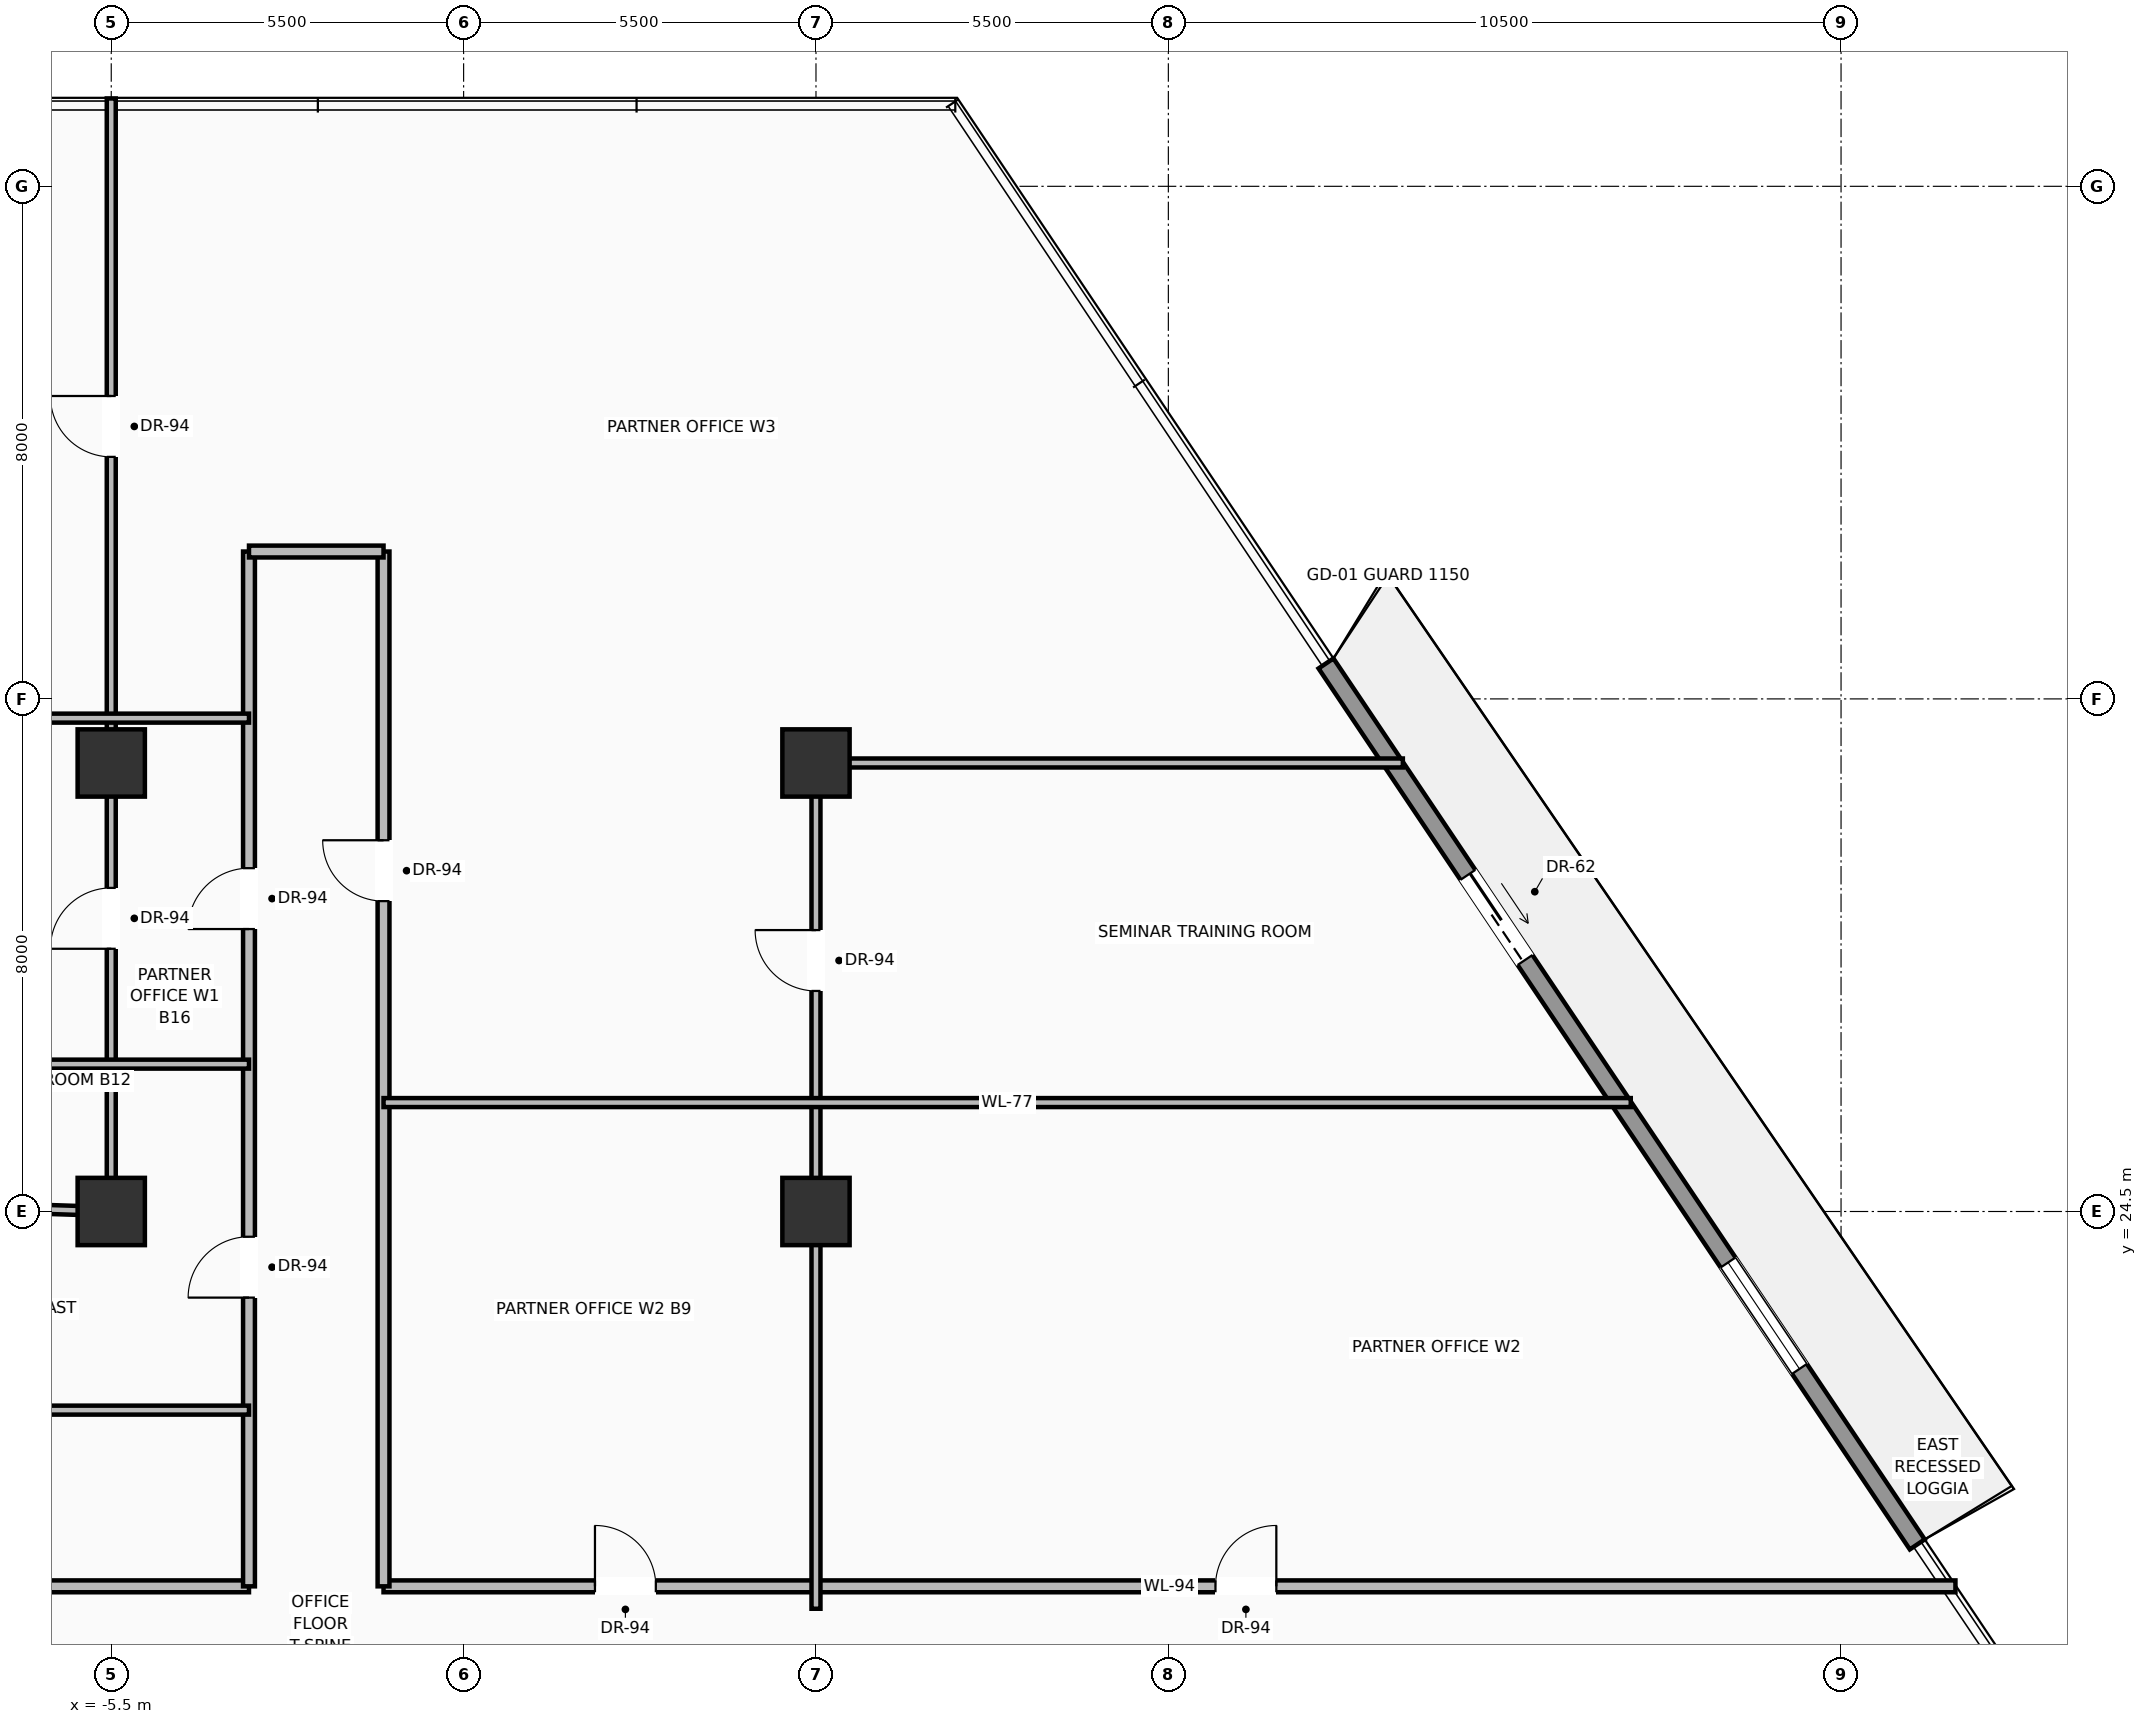
"""IFC4 building model, lengths in metres.
Left out: names, types, materials, properties, quantities, classifications, styles, units other than length and angle.
Written with IfcOpenShell. Run it as: python <this file> out.ifc"""

import sys

from ifc_helpers import new_model, si_unit, direction, frame, frame_2d, origin, origin_2d, place, context, subcontext, project, spatial, rectangle, extrude, source, transform, mapped, element, fill, save


model = new_model("IFC4")
c1 = context("Model", 3, precision=1e-05, world=origin(), true_north=direction((0.0, 1.0)))
c2 = subcontext(c1, "Body", "Model", "MODEL_VIEW")
j1 = project(units=[si_unit("LENGTHUNIT", "METRE"), si_unit("PLANEANGLEUNIT", "RADIAN")], contexts=[c1])
p1 = place(None, origin())
s1 = spatial("IfcSite", under=j1, at=p1, CompositionType="ELEMENT")
p2 = place(p1, origin())
s2 = spatial("IfcBuilding", under=s1, at=p2, CompositionType="ELEMENT")
p3 = place(p2, frame((0.0, 0.0, 46.0)))
s3 = spatial("IfcBuildingStorey", under=s2, at=p3, CompositionType="ELEMENT", Elevation=46.0)
m1 = source(origin(), c2, "Body", "SweptSolid", [
    extrude(rectangle(XDim=1.05, YDim=1.05, at=origin_2d()), origin(), (0.0, 0.0, 1.0), 3.7),
])
for number, where, z_axis, x_axis in (
    (1, (-5.5, 24.5, 0.0), (0.0, 0.0, 1.0), (1.0, 0.0, 0.0)),
    (2, (5.5, 24.5, 0.0), (0.0, 0.0, 1.0), (1.0, 0.0, 0.0)),
    (3, (-5.5, 31.5, 0.0), (0.0, 0.0, 1.0), (1.0, 0.0, 0.0)),
    (4, (5.5, 31.5, 0.0), (0.0, 0.0, 1.0), (1.0, 0.0, 0.0)),
):
    element("IfcColumn", number, at=place(p3, frame(where, z_axis=z_axis, x_axis=x_axis)), inside=s3, PredefinedType="COLUMN", context=c2, shape_type="MappedRepresentation", body=[
        mapped(m1, transform((0.0, 0.0, 0.0), scale=1.0)),
    ])
p4 = place(p3, frame((13.461, 33.053, 0.0), z_axis=(0.0, 0.0, 1.0), x_axis=(0.557313833553, -0.830301927573, 0.0)))
e5 = element("IfcWall", 5, at=p4, inside=s3, PredefinedType="SOLIDWALL", context=c2, shape_type="SweptSolid", body=[
    extrude(rectangle(XDim=16.559, YDim=0.28, at=frame_2d((8.28, 0.0))), origin(), (0.0, 0.0, 1.0), 3.03),
])
p5 = place(p4, frame((3.974, 0.0, 0.0)))
e6 = element("IfcOpeningElement", 6, at=p5, cuts=e5, PredefinedType="OPENING", context=c2, shape_type="SweptSolid", body=[
    extrude(rectangle(XDim=1.6, YDim=2.35, at=frame_2d((0.8, 1.175))), frame((0.0, 0.15, 0.0), z_axis=(0.0, -1.0, 0.0), x_axis=(1.0, 0.0, 0.0)), (0.0, 0.0, 1.0), 0.3),
])
p6 = place(p4, frame((11.26, 0.0, 0.9)))
e7 = element("IfcOpeningElement", 7, at=p6, cuts=e5, PredefinedType="OPENING", context=c2, shape_type="SweptSolid", body=[
    extrude(rectangle(XDim=2.0, YDim=1.85, at=frame_2d((1.0, 0.925))), frame((0.0, 0.15, 0.0), z_axis=(0.0, -1.0, 0.0), x_axis=(1.0, 0.0, 0.0)), (0.0, 0.0, 1.0), 0.3),
])
p7 = place(p3, frame((-23.096, 18.65, 0.0), z_axis=(0.0, 0.0, 1.0), x_axis=(1.0, 0.0, 0.0)))
e8 = element("IfcWall", 8, at=p7, inside=s3, PredefinedType="PARTITIONING", context=c2, shape_type="SweptSolid", body=[
    extrude(rectangle(XDim=19.746, YDim=0.185, at=frame_2d((9.873, 0.0))), origin(), (0.0, 0.0, 1.0), 2.747),
])
p8 = place(p7, frame((8.445, 0.0, 0.0)))
e9 = element("IfcOpeningElement", 9, at=p8, cuts=e8, PredefinedType="OPENING", context=c2, shape_type="SweptSolid", body=[
    extrude(rectangle(XDim=0.95, YDim=2.2, at=frame_2d((0.475, 1.1))), frame((0.0, 0.103, 0.0), z_axis=(0.0, -1.0, 0.0), x_axis=(1.0, 0.0, 0.0)), (0.0, 0.0, 1.0), 0.205),
])
p9 = place(p7, frame((14.85, 0.0, 0.0)))
e10 = element("IfcOpeningElement", 10, at=p9, cuts=e8, PredefinedType="OPENING", context=c2, shape_type="SweptSolid", body=[
    extrude(rectangle(XDim=0.95, YDim=2.2, at=frame_2d((0.475, 1.1))), frame((0.0, 0.103, 0.0), z_axis=(0.0, -1.0, 0.0), x_axis=(1.0, 0.0, 0.0)), (0.0, 0.0, 1.0), 0.205),
])
p10 = place(p3, frame((-1.25, 18.65, 0.0), z_axis=(0.0, 0.0, 1.0), x_axis=(1.0, 0.0, 0.0)))
e11 = element("IfcWall", 11, at=p10, inside=s3, PredefinedType="PARTITIONING", context=c2, shape_type="SweptSolid", body=[
    extrude(rectangle(XDim=24.535, YDim=0.185, at=frame_2d((12.268, 0.0))), origin(), (0.0, 0.0, 1.0), 2.747),
])
p11 = place(p10, frame((12.986, 0.0, 0.0)))
e12 = element("IfcOpeningElement", 12, at=p11, cuts=e11, PredefinedType="OPENING", context=c2, shape_type="SweptSolid", body=[
    extrude(rectangle(XDim=0.95, YDim=2.2, at=frame_2d((0.475, 1.1))), frame((0.0, 0.103, 0.0), z_axis=(0.0, -1.0, 0.0), x_axis=(1.0, 0.0, 0.0)), (0.0, 0.0, 1.0), 0.205),
])
p12 = place(p10, frame((3.3, 0.0, 0.0)))
e13 = element("IfcOpeningElement", 13, at=p12, cuts=e11, PredefinedType="OPENING", context=c2, shape_type="SweptSolid", body=[
    extrude(rectangle(XDim=0.95, YDim=2.2, at=frame_2d((0.475, 1.1))), frame((0.0, 0.103, 0.0), z_axis=(0.0, -1.0, 0.0), x_axis=(1.0, 0.0, 0.0)), (0.0, 0.0, 1.0), 0.205),
])
p13 = place(p3, frame((-3.35, 18.65, 0.0), z_axis=(0.0, 0.0, 1.0), x_axis=(0.0, 1.0, 0.0)))
e14 = element("IfcWall", 14, at=p13, inside=s3, PredefinedType="PARTITIONING", context=c2, shape_type="SweptSolid", body=[
    extrude(rectangle(XDim=16.15, YDim=0.185, at=frame_2d((8.075, 0.0))), origin(), (0.0, 0.0, 1.0), 2.747),
])
p14 = place(p13, frame((4.506, 0.0, 0.0)))
e15 = element("IfcOpeningElement", 15, at=p14, cuts=e14, PredefinedType="OPENING", context=c2, shape_type="SweptSolid", body=[
    extrude(rectangle(XDim=0.95, YDim=2.2, at=frame_2d((0.475, 1.1))), frame((0.0, 0.103, 0.0), z_axis=(0.0, -1.0, 0.0), x_axis=(1.0, 0.0, 0.0)), (0.0, 0.0, 1.0), 0.205),
])
p15 = place(p13, frame((10.258, 0.0, 0.0)))
e16 = element("IfcOpeningElement", 16, at=p15, cuts=e14, PredefinedType="OPENING", context=c2, shape_type="SweptSolid", body=[
    extrude(rectangle(XDim=0.95, YDim=2.2, at=frame_2d((0.475, 1.1))), frame((0.0, 0.103, 0.0), z_axis=(0.0, -1.0, 0.0), x_axis=(1.0, 0.0, 0.0)), (0.0, 0.0, 1.0), 0.205),
])
p16 = place(p3, frame((-1.25, 18.65, 0.0), z_axis=(0.0, 0.0, 1.0), x_axis=(0.0, 1.0, 0.0)))
e17 = element("IfcWall", 17, at=p16, inside=s3, PredefinedType="PARTITIONING", context=c2, shape_type="SweptSolid", body=[
    extrude(rectangle(XDim=16.15, YDim=0.185, at=frame_2d((8.075, 0.0))), origin(), (0.0, 0.0, 1.0), 2.747),
])
p17 = place(p16, frame((10.694, 0.0, 0.0)))
e18 = element("IfcOpeningElement", 18, at=p17, cuts=e17, PredefinedType="OPENING", context=c2, shape_type="SweptSolid", body=[
    extrude(rectangle(XDim=0.95, YDim=2.2, at=frame_2d((0.475, 1.1))), frame((0.0, 0.103, 0.0), z_axis=(0.0, -1.0, 0.0), x_axis=(1.0, 0.0, 0.0)), (0.0, 0.0, 1.0), 0.205),
])
p18 = place(p3, frame((-3.35, 34.8, 0.0), z_axis=(0.0, 0.0, 1.0), x_axis=(1.0, 0.0, 0.0)))
e19 = element("IfcWall", 19, at=p18, inside=s3, PredefinedType="PARTITIONING", context=c2, shape_type="SweptSolid", body=[
    extrude(rectangle(XDim=2.1, YDim=0.185, at=frame_2d((1.05, 0.0))), origin(), (0.0, 0.0, 1.0), 2.979),
])
p19 = place(p3, frame((-5.5, 24.5, 0.0), z_axis=(0.0, 0.0, 1.0), x_axis=(0.0, 1.0, 0.0)))
e20 = element("IfcWall", 20, at=p19, inside=s3, PredefinedType="PARTITIONING", context=c2, shape_type="SweptSolid", body=[
    extrude(rectangle(XDim=17.371, YDim=0.14, at=frame_2d((8.686, 0.0))), origin(), (0.0, 0.0, 1.0), 2.747),
])
p20 = place(p19, frame((11.777, 0.0, 0.0)))
e21 = element("IfcOpeningElement", 21, at=p20, cuts=e20, PredefinedType="OPENING", context=c2, shape_type="SweptSolid", body=[
    extrude(rectangle(XDim=0.95, YDim=2.2, at=frame_2d((0.475, 1.1))), frame((0.0, 0.08, 0.0), z_axis=(0.0, -1.0, 0.0), x_axis=(1.0, 0.0, 0.0)), (0.0, 0.0, 1.0), 0.16),
])
p21 = place(p19, frame((4.1, 0.0, 0.0)))
e22 = element("IfcOpeningElement", 22, at=p21, cuts=e20, PredefinedType="OPENING", context=c2, shape_type="SweptSolid", body=[
    extrude(rectangle(XDim=0.95, YDim=2.2, at=frame_2d((0.475, 1.1))), frame((0.0, 0.08, 0.0), z_axis=(0.0, -1.0, 0.0), x_axis=(1.0, 0.0, 0.0)), (0.0, 0.0, 1.0), 0.16),
])
p22 = place(p3, frame((5.5, 18.3, 0.0), z_axis=(0.0, 0.0, 1.0), x_axis=(0.0, 1.0, 0.0)))
e23 = element("IfcWall", 23, at=p22, inside=s3, PredefinedType="PARTITIONING", context=c2, shape_type="SweptSolid", body=[
    extrude(rectangle(XDim=13.2, YDim=0.14, at=frame_2d((6.6, 0.0))), origin(), (0.0, 0.0, 1.0), 2.747),
])
p23 = place(p22, frame((9.642, 0.0, 0.0)))
e24 = element("IfcOpeningElement", 24, at=p23, cuts=e23, PredefinedType="OPENING", context=c2, shape_type="SweptSolid", body=[
    extrude(rectangle(XDim=0.95, YDim=2.2, at=frame_2d((0.475, 1.1))), frame((0.0, 0.08, 0.0), z_axis=(0.0, -1.0, 0.0), x_axis=(1.0, 0.0, 0.0)), (0.0, 0.0, 1.0), 0.16),
])
p24 = place(p3, frame((-18.819, 24.928, 0.0), z_axis=(0.0, 0.0, 1.0), x_axis=(0.999482929185, -0.032153915288, 0.0)))
e25 = element("IfcWall", 25, at=p24, inside=s3, PredefinedType="PARTITIONING", context=c2, shape_type="SweptSolid", body=[
    extrude(rectangle(XDim=13.325, YDim=0.14, at=frame_2d((6.663, 0.0))), origin(), (0.0, 0.0, 1.0), 2.747),
])
p25 = place(p24, frame((9.438, 0.0, 0.0)))
e26 = element("IfcOpeningElement", 26, at=p25, cuts=e25, PredefinedType="OPENING", context=c2, shape_type="SweptSolid", body=[
    extrude(rectangle(XDim=0.95, YDim=2.2, at=frame_2d((0.475, 1.1))), frame((0.0, 0.08, 0.0), z_axis=(0.0, -1.0, 0.0), x_axis=(1.0, 0.0, 0.0)), (0.0, 0.0, 1.0), 0.16),
])
p26 = place(p24, frame((3.471, 0.0, 0.0)))
e27 = element("IfcOpeningElement", 27, at=p26, cuts=e25, PredefinedType="OPENING", context=c2, shape_type="SweptSolid", body=[
    extrude(rectangle(XDim=0.95, YDim=2.2, at=frame_2d((0.475, 1.1))), frame((0.0, 0.08, 0.0), z_axis=(0.0, -1.0, 0.0), x_axis=(1.0, 0.0, 0.0)), (0.0, 0.0, 1.0), 0.16),
])
p27 = place(p3, frame((5.5, 31.5, 0.0), z_axis=(0.0, 0.0, 1.0), x_axis=(1.0, 0.0, 0.0)))
e28 = element("IfcWall", 28, at=p27, inside=s3, PredefinedType="PARTITIONING", context=c2, shape_type="SweptSolid", body=[
    extrude(rectangle(XDim=9.16, YDim=0.14, at=frame_2d((4.58, 0.0))), origin(), (0.0, 0.0, 1.0), 2.747),
])
p28 = place(p3, frame((-21.223, 21.4, 0.0), z_axis=(0.0, 0.0, 1.0), x_axis=(1.0, 0.0, 0.0)))
e29 = element("IfcWall", 29, at=p28, inside=s3, PredefinedType="PARTITIONING", context=c2, shape_type="SweptSolid", body=[
    extrude(rectangle(XDim=17.873, YDim=0.14, at=frame_2d((8.936, 0.0))), origin(), (0.0, 0.0, 1.0), 2.747),
])
p29 = place(p28, frame((4.681, 0.0, 0.0)))
e30 = element("IfcOpeningElement", 30, at=p29, cuts=e29, PredefinedType="OPENING", context=c2, shape_type="SweptSolid", body=[
    extrude(rectangle(XDim=0.95, YDim=2.2, at=frame_2d((0.475, 1.1))), frame((0.0, 0.08, 0.0), z_axis=(0.0, -1.0, 0.0), x_axis=(1.0, 0.0, 0.0)), (0.0, 0.0, 1.0), 0.16),
])
p30 = place(p3, frame((-17.543, 26.8, 0.0), z_axis=(0.0, 0.0, 1.0), x_axis=(1.0, 0.0, 0.0)))
e31 = element("IfcWall", 31, at=p30, inside=s3, PredefinedType="PARTITIONING", context=c2, shape_type="SweptSolid", body=[
    extrude(rectangle(XDim=14.193, YDim=0.14, at=frame_2d((7.097, 0.0))), origin(), (0.0, 0.0, 1.0), 2.747),
])
p31 = place(p30, frame((2.88, 0.0, 0.0)))
e32 = element("IfcOpeningElement", 32, at=p31, cuts=e31, PredefinedType="OPENING", context=c2, shape_type="SweptSolid", body=[
    extrude(rectangle(XDim=0.95, YDim=2.2, at=frame_2d((0.475, 1.1))), frame((0.0, 0.08, 0.0), z_axis=(0.0, -1.0, 0.0), x_axis=(1.0, 0.0, 0.0)), (0.0, 0.0, 1.0), 0.16),
])
p32 = place(p3, frame((-13.864, 32.2, 0.0), z_axis=(0.0, 0.0, 1.0), x_axis=(1.0, 0.0, 0.0)))
e33 = element("IfcWall", 33, at=p32, inside=s3, PredefinedType="PARTITIONING", context=c2, shape_type="SweptSolid", body=[
    extrude(rectangle(XDim=10.514, YDim=0.14, at=frame_2d((5.257, 0.0))), origin(), (0.0, 0.0, 1.0), 2.747),
])
p33 = place(p3, frame((-1.25, 26.2, 0.0), z_axis=(0.0, 0.0, 1.0), x_axis=(1.0, 0.0, 0.0)))
e34 = element("IfcWall", 34, at=p33, inside=s3, PredefinedType="PARTITIONING", context=c2, shape_type="SweptSolid", body=[
    extrude(rectangle(XDim=19.468, YDim=0.14, at=frame_2d((9.734, 0.0))), origin(), (0.0, 0.0, 1.0), 2.747),
])
m2 = source(origin(), c2, "Body", "SweptSolid", [
    extrude(rectangle(XDim=1.6, YDim=2.35, at=frame_2d((0.8, 1.175))), frame((0.0, 0.025, 0.0), z_axis=(0.0, -1.0, 0.0), x_axis=(1.0, 0.0, 0.0)), (0.0, 0.0, 1.0), 0.05),
])
p34 = place(p5, origin())
e35 = element("IfcDoor", 35, at=p34, inside=s3, OperationType="SLIDING_TO_RIGHT", PredefinedType="DOOR", context=c2, shape_type="MappedRepresentation", body=[
    mapped(m2, transform((0.0, 0.0, 0.0), scale=1.0)),
])
fill(e6, e35)
m3 = source(origin(), c2, "Body", "SweptSolid", [
    extrude(rectangle(XDim=2.0, YDim=1.85, at=frame_2d((1.0, 0.925))), frame((0.0, 0.03, 0.0), z_axis=(0.0, -1.0, 0.0), x_axis=(1.0, 0.0, 0.0)), (0.0, 0.0, 1.0), 0.06),
])
p35 = place(p6, origin())
e36 = element("IfcWindow", 36, at=p35, inside=s3, PartitioningType="SINGLE_PANEL", PredefinedType="WINDOW", context=c2, shape_type="MappedRepresentation", body=[
    mapped(m3, transform((0.0, 0.0, 0.0), scale=1.0)),
])
fill(e7, e36)
m4 = source(origin(), c2, "Body", "SweptSolid", [
    extrude(rectangle(XDim=0.95, YDim=2.2, at=frame_2d((0.475, 1.1))), frame((0.0, 0.025, 0.0), z_axis=(0.0, -1.0, 0.0), x_axis=(1.0, 0.0, 0.0)), (0.0, 0.0, 1.0), 0.05),
])
p36 = place(p11, origin())
e37 = element("IfcDoor", 37, at=p36, inside=s3, OperationType="SINGLE_SWING_RIGHT", PredefinedType="DOOR", context=c2, shape_type="MappedRepresentation", body=[
    mapped(m4, transform((0.0, 0.0, 0.0), scale=1.0)),
])
fill(e12, e37)
p37 = place(p14, origin())
e38 = element("IfcDoor", 38, at=p37, inside=s3, OperationType="SINGLE_SWING_LEFT", PredefinedType="DOOR", context=c2, shape_type="MappedRepresentation", body=[
    mapped(m4, transform((0.0, 0.0, 0.0), scale=1.0)),
])
fill(e15, e38)
p38 = place(p17, origin())
e39 = element("IfcDoor", 39, at=p38, inside=s3, OperationType="SINGLE_SWING_RIGHT", PredefinedType="DOOR", context=c2, shape_type="MappedRepresentation", body=[
    mapped(m4, transform((0.0, 0.0, 0.0), scale=1.0)),
])
fill(e18, e39)
p39 = place(p12, origin())
e40 = element("IfcDoor", 40, at=p39, inside=s3, OperationType="SINGLE_SWING_LEFT", PredefinedType="DOOR", context=c2, shape_type="MappedRepresentation", body=[
    mapped(m4, transform((0.0, 0.0, 0.0), scale=1.0)),
])
fill(e13, e40)
p40 = place(p23, origin())
e41 = element("IfcDoor", 41, at=p40, inside=s3, OperationType="SINGLE_SWING_RIGHT", PredefinedType="DOOR", context=c2, shape_type="MappedRepresentation", body=[
    mapped(m4, transform((0.0, 0.0, 0.0), scale=1.0)),
])
fill(e24, e41)
p41 = place(p15, origin())
e42 = element("IfcDoor", 42, at=p41, inside=s3, OperationType="SINGLE_SWING_LEFT", PredefinedType="DOOR", context=c2, shape_type="MappedRepresentation", body=[
    mapped(m4, transform((0.0, 0.0, 0.0), scale=1.0)),
])
fill(e16, e42)
p42 = place(p20, origin())
e43 = element("IfcDoor", 43, at=p42, inside=s3, OperationType="SINGLE_SWING_RIGHT", PredefinedType="DOOR", context=c2, shape_type="MappedRepresentation", body=[
    mapped(m4, transform((0.0, 0.0, 0.0), scale=1.0)),
])
fill(e21, e43)
p43 = place(p21, origin())
e44 = element("IfcDoor", 44, at=p43, inside=s3, OperationType="SINGLE_SWING_LEFT", PredefinedType="DOOR", context=c2, shape_type="MappedRepresentation", body=[
    mapped(m4, transform((0.0, 0.0, 0.0), scale=1.0)),
])
fill(e22, e44)
save(model, sys.argv[1])
